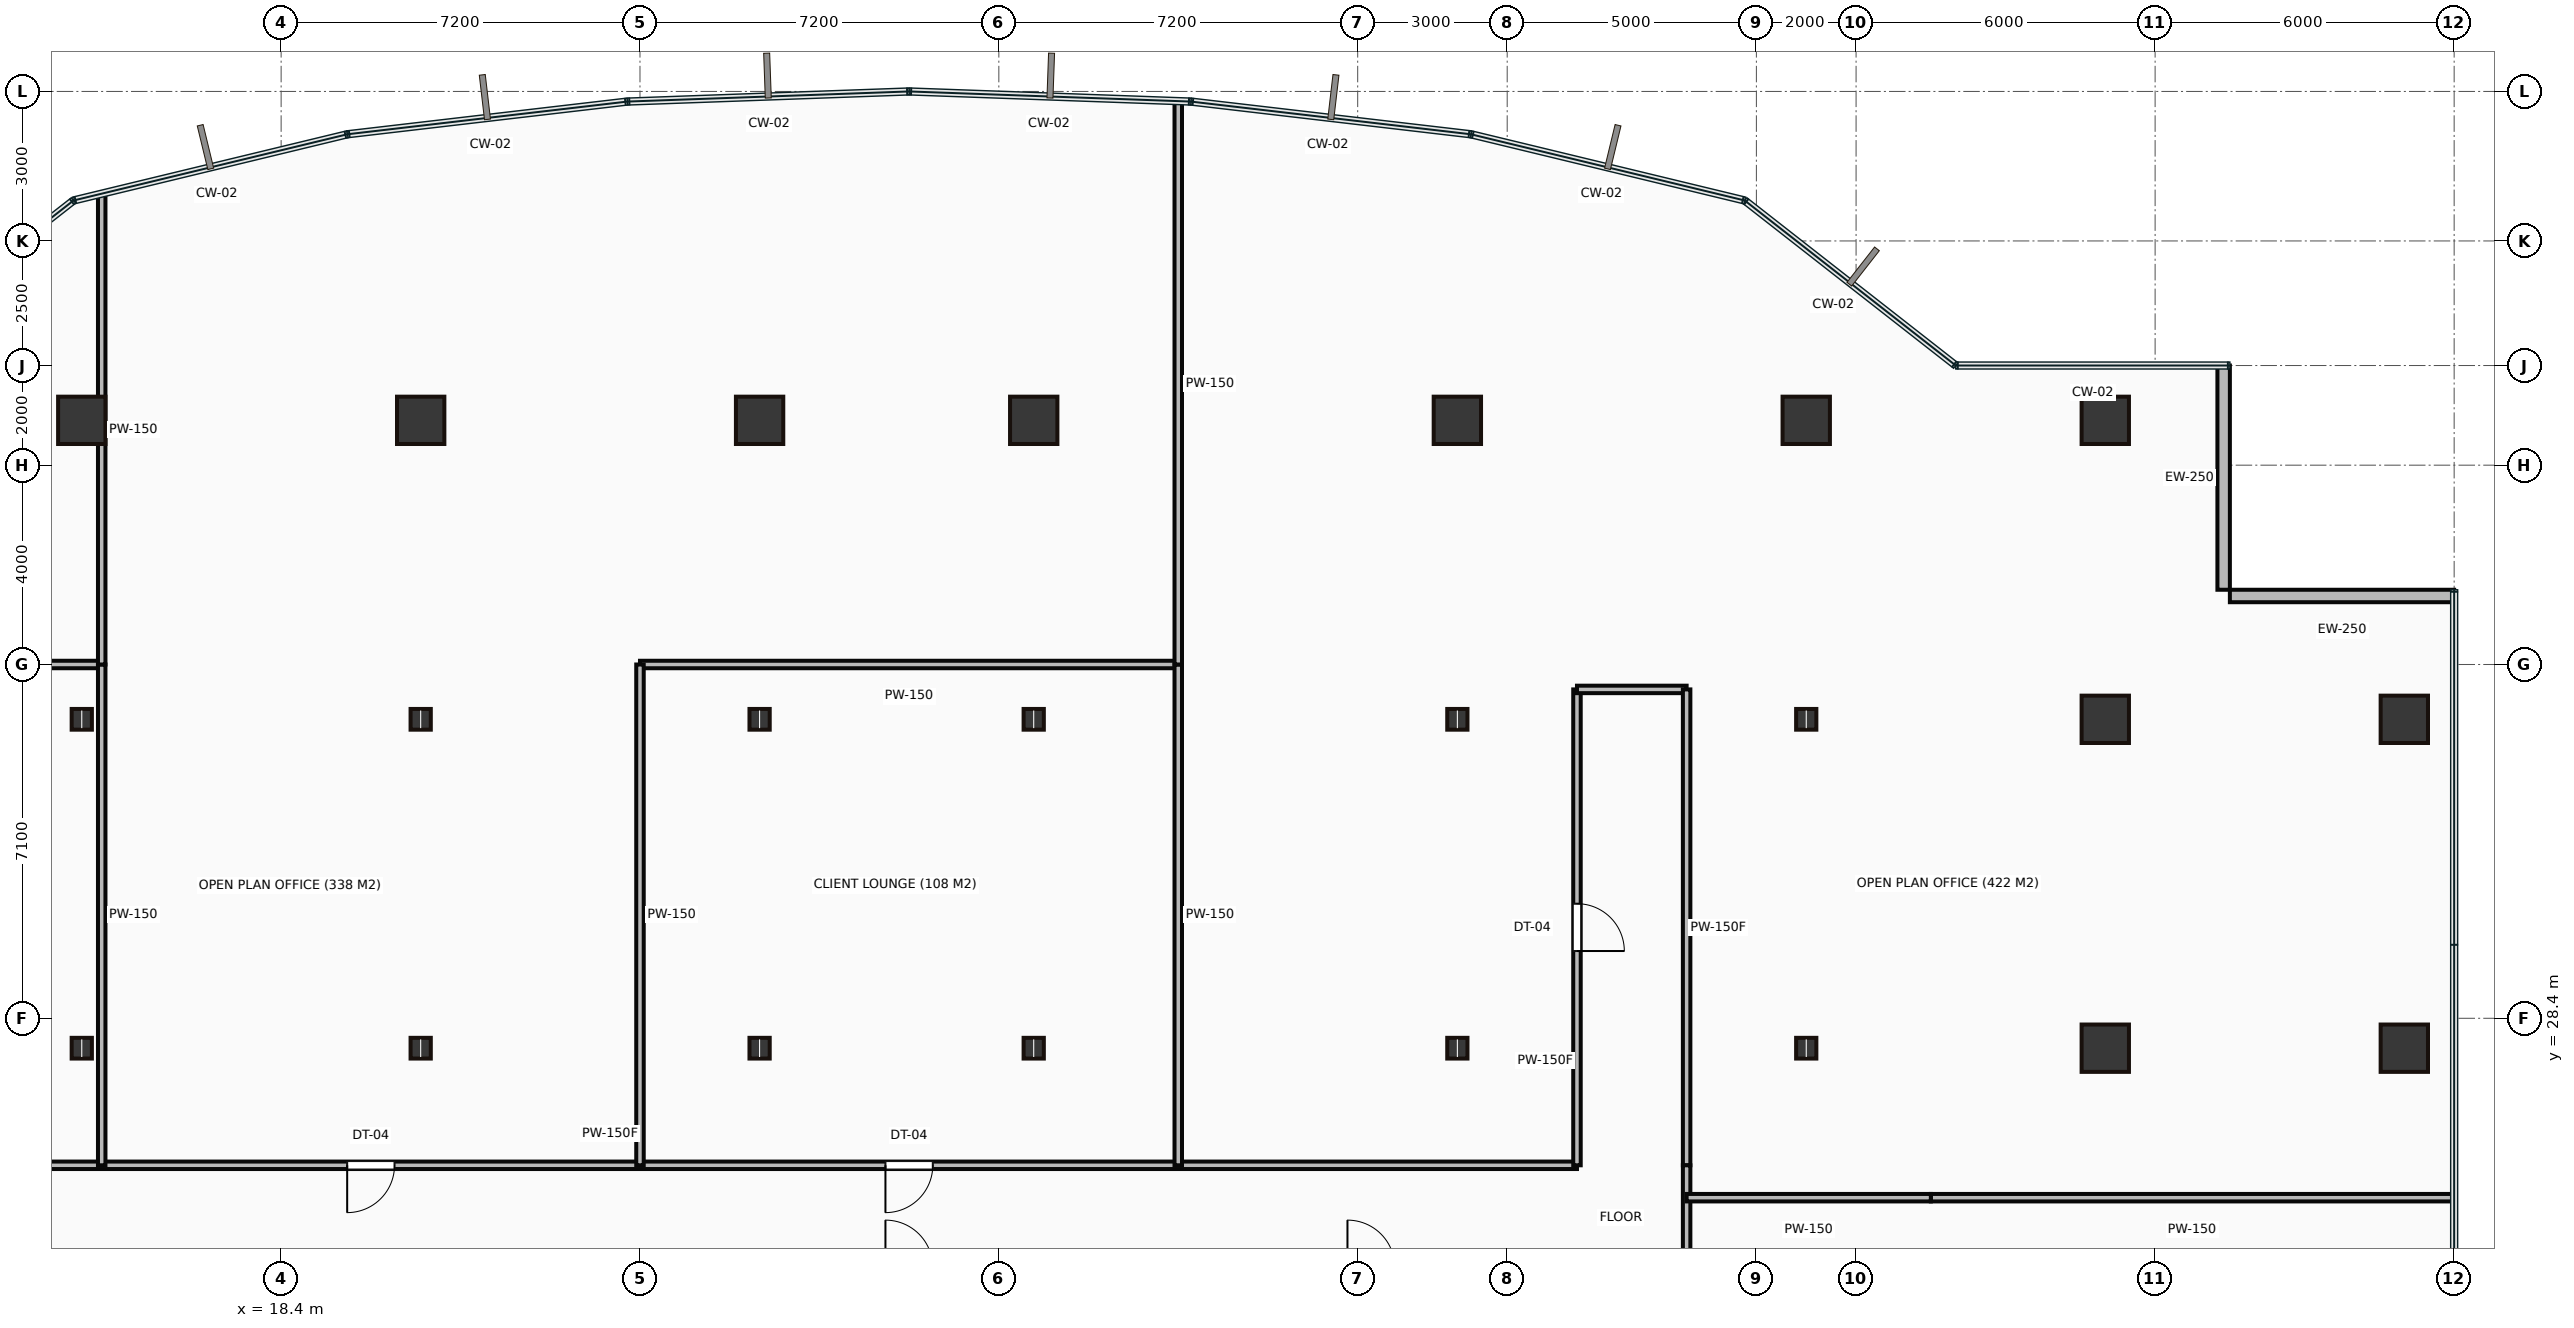
"""IFC4 building model, lengths in metres.
Left out: names, types, materials, properties, quantities, classifications, styles, units other than length and angle.
Written with IfcOpenShell. Run it as: python <this file> out.ifc"""

import sys

from ifc_helpers import new_model, si_unit, direction, frame, frame_2d, origin, origin_2d, place, context, subcontext, project, spatial, rectangle, hollow_rectangle, i_section, extrude, source, transform, mapped, element, fill, save


model = new_model("IFC4")
c1 = context("Model", 3, precision=1e-05, world=origin(), true_north=direction((0.0, 1.0)))
c2 = subcontext(c1, "Body", "Model", "MODEL_VIEW")
j1 = project(units=[si_unit("LENGTHUNIT", "METRE"), si_unit("PLANEANGLEUNIT", "RADIAN")], contexts=[c1])
p1 = place(None, origin())
s1 = spatial("IfcSite", under=j1, at=p1, CompositionType="ELEMENT")
p2 = place(p1, origin())
s2 = spatial("IfcBuilding", under=s1, at=p2, CompositionType="ELEMENT")
p3 = place(p2, frame((0.0, 0.0, 69.0)))
s3 = spatial("IfcBuildingStorey", under=s2, at=p3, CompositionType="ELEMENT", Elevation=69.0)
m1 = source(origin(), c2, "Body", "SweptSolid", [
    extrude(i_section(OverallWidth=0.406, OverallDepth=0.416, WebThickness=0.03, FlangeThickness=0.048, at=origin_2d()), origin(), (0.0, 0.0, 1.0), 3.65),
])
for number, where, z_axis, x_axis in (
    (1, (14.4, 27.8, 0.0), (0.0, 0.0, 1.0), (1.0, 0.0, 0.0)),
    (2, (14.4, 34.4, 0.0), (0.0, 0.0, 1.0), (1.0, 0.0, 0.0)),
):
    element("IfcColumn", number, at=place(p3, frame(where, z_axis=z_axis, x_axis=x_axis)), inside=s3, PredefinedType="COLUMN", context=c2, shape_type="MappedRepresentation", body=[
        mapped(m1, transform((0.0, 0.0, 0.0))),
    ])
m2 = source(origin(), c2, "Body", "SweptSolid", [
    extrude(hollow_rectangle(XDim=0.95, YDim=0.95, WallThickness=0.045, at=origin_2d()), origin(), (0.0, 0.0, 1.0), 3.65),
])
p4 = place(p3, frame((14.4, 40.4, 0.0), z_axis=(0.0, 0.0, 1.0), x_axis=(1.0, 0.0, 0.0)))
e3 = element("IfcColumn", 3, at=p4, inside=s3, PredefinedType="COLUMN", context=c2, shape_type="MappedRepresentation", body=[
    mapped(m2, transform((0.0, 0.0, 0.0))),
])
for number, where, z_axis, x_axis in (
    (4, (21.2, 27.8, 0.0), (0.0, 0.0, 1.0), (1.0, 0.0, 0.0)),
    (5, (21.2, 34.4, 0.0), (0.0, 0.0, 1.0), (1.0, 0.0, 0.0)),
):
    element("IfcColumn", number, at=place(p3, frame(where, z_axis=z_axis, x_axis=x_axis)), inside=s3, PredefinedType="COLUMN", context=c2, shape_type="MappedRepresentation", body=[
        mapped(m1, transform((0.0, 0.0, 0.0))),
    ])
p5 = place(p3, frame((21.2, 40.4, 0.0), z_axis=(0.0, 0.0, 1.0), x_axis=(1.0, 0.0, 0.0)))
e6 = element("IfcColumn", 6, at=p5, inside=s3, PredefinedType="COLUMN", context=c2, shape_type="MappedRepresentation", body=[
    mapped(m2, transform((0.0, 0.0, 0.0))),
])
for number, where, z_axis, x_axis in (
    (7, (28.0, 27.8, 0.0), (0.0, 0.0, 1.0), (1.0, 0.0, 0.0)),
    (8, (28.0, 34.4, 0.0), (0.0, 0.0, 1.0), (1.0, 0.0, 0.0)),
):
    element("IfcColumn", number, at=place(p3, frame(where, z_axis=z_axis, x_axis=x_axis)), inside=s3, PredefinedType="COLUMN", context=c2, shape_type="MappedRepresentation", body=[
        mapped(m1, transform((0.0, 0.0, 0.0))),
    ])
p6 = place(p3, frame((28.0, 40.4, 0.0), z_axis=(0.0, 0.0, 1.0), x_axis=(1.0, 0.0, 0.0)))
e9 = element("IfcColumn", 9, at=p6, inside=s3, PredefinedType="COLUMN", context=c2, shape_type="MappedRepresentation", body=[
    mapped(m2, transform((0.0, 0.0, 0.0))),
])
for number, where, z_axis, x_axis in (
    (10, (33.5, 27.8, 0.0), (0.0, 0.0, 1.0), (1.0, 0.0, 0.0)),
    (11, (33.5, 34.4, 0.0), (0.0, 0.0, 1.0), (1.0, 0.0, 0.0)),
):
    element("IfcColumn", number, at=place(p3, frame(where, z_axis=z_axis, x_axis=x_axis)), inside=s3, PredefinedType="COLUMN", context=c2, shape_type="MappedRepresentation", body=[
        mapped(m1, transform((0.0, 0.0, 0.0))),
    ])
p7 = place(p3, frame((33.5, 40.4, 0.0), z_axis=(0.0, 0.0, 1.0), x_axis=(1.0, 0.0, 0.0)))
e12 = element("IfcColumn", 12, at=p7, inside=s3, PredefinedType="COLUMN", context=c2, shape_type="MappedRepresentation", body=[
    mapped(m2, transform((0.0, 0.0, 0.0))),
])
for number, where, z_axis, x_axis in (
    (13, (42.0, 27.8, 0.0), (0.0, 0.0, 1.0), (1.0, 0.0, 0.0)),
    (14, (42.0, 34.4, 0.0), (0.0, 0.0, 1.0), (1.0, 0.0, 0.0)),
):
    element("IfcColumn", number, at=place(p3, frame(where, z_axis=z_axis, x_axis=x_axis)), inside=s3, PredefinedType="COLUMN", context=c2, shape_type="MappedRepresentation", body=[
        mapped(m1, transform((0.0, 0.0, 0.0))),
    ])
p8 = place(p3, frame((42.0, 40.4, 0.0), z_axis=(0.0, 0.0, 1.0), x_axis=(1.0, 0.0, 0.0)))
e15 = element("IfcColumn", 15, at=p8, inside=s3, PredefinedType="COLUMN", context=c2, shape_type="MappedRepresentation", body=[
    mapped(m2, transform((0.0, 0.0, 0.0))),
])
for number, where, z_axis, x_axis in (
    (16, (49.0, 27.8, 0.0), (0.0, 0.0, 1.0), (1.0, 0.0, 0.0)),
    (17, (49.0, 34.4, 0.0), (0.0, 0.0, 1.0), (1.0, 0.0, 0.0)),
):
    element("IfcColumn", number, at=place(p3, frame(where, z_axis=z_axis, x_axis=x_axis)), inside=s3, PredefinedType="COLUMN", context=c2, shape_type="MappedRepresentation", body=[
        mapped(m1, transform((0.0, 0.0, 0.0))),
    ])
for number, where, z_axis, x_axis in (
    (18, (49.0, 40.4, 0.0), (0.0, 0.0, 1.0), (1.0, 0.0, 0.0)),
    (19, (55.0, 27.8, 0.0), (0.0, 0.0, 1.0), (1.0, 0.0, 0.0)),
    (20, (55.0, 34.4, 0.0), (0.0, 0.0, 1.0), (1.0, 0.0, 0.0)),
    (21, (55.0, 40.4, 0.0), (0.0, 0.0, 1.0), (1.0, 0.0, 0.0)),
    (22, (61.0, 27.8, 0.0), (0.0, 0.0, 1.0), (1.0, 0.0, 0.0)),
    (23, (61.0, 34.4, 0.0), (0.0, 0.0, 1.0), (1.0, 0.0, 0.0)),
):
    element("IfcColumn", number, at=place(p3, frame(where, z_axis=z_axis, x_axis=x_axis)), inside=s3, PredefinedType="COLUMN", context=c2, shape_type="MappedRepresentation", body=[
        mapped(m2, transform((0.0, 0.0, 0.0))),
    ])
m3 = source(origin(), c2, "Body", "SweptSolid", [
    extrude(rectangle(XDim=4.5, YDim=0.25, at=frame_2d((2.25, 0.0))), origin(), (0.0, 0.0, 1.0), 3.4),
])
for number, where, z_axis, x_axis in (
    (24, (62.0, 36.875, 0.0), (0.0, 0.0, 1.0), (-1.0, 0.0, 0.0)),
    (25, (57.375, 37.0, 0.0), (0.0, 0.0, 1.0), (0.0, 1.0, 0.0)),
):
    element("IfcWall", number, at=place(p3, frame(where, z_axis=z_axis, x_axis=x_axis)), inside=s3, PredefinedType="STANDARD", context=c2, shape_type="MappedRepresentation", body=[
        mapped(m3, transform((0.0, 0.0, 0.0))),
    ])
m4 = source(origin(), c2, "Body", "SweptSolid", [
    extrude(rectangle(XDim=38.8, YDim=0.15, at=frame_2d((19.4, 0.0))), origin(), (0.0, 0.0, 1.0), 3.4),
])
p9 = place(p3, frame((5.6, 25.45, 0.0), z_axis=(0.0, 0.0, 1.0), x_axis=(1.0, 0.0, 0.0)))
e26 = element("IfcWall", 26, at=p9, inside=s3, PredefinedType="PARTITIONING", context=c2, shape_type="MappedRepresentation", body=[
    mapped(m4, transform((0.0, 0.0, 0.0))),
])
p10 = place(p9, frame((14.125, 0.0, 0.0)))
e27 = element("IfcOpeningElement", 27, at=p10, cuts=e26, PredefinedType="OPENING", context=c2, shape_type="SweptSolid", body=[
    extrude(rectangle(XDim=0.95, YDim=2.15, at=frame_2d((0.475, 1.075))), frame((0.0, 0.085, 0.0), z_axis=(0.0, -1.0, 0.0), x_axis=(1.0, 0.0, 0.0)), (0.0, 0.0, 1.0), 0.17),
])
p11 = place(p9, frame((24.925, 0.0, 0.0)))
e28 = element("IfcOpeningElement", 28, at=p11, cuts=e26, PredefinedType="OPENING", context=c2, shape_type="SweptSolid", body=[
    extrude(rectangle(XDim=0.95, YDim=2.15, at=frame_2d((0.475, 1.075))), frame((0.0, 0.085, 0.0), z_axis=(0.0, -1.0, 0.0), x_axis=(1.0, 0.0, 0.0)), (0.0, 0.0, 1.0), 0.17),
])
m5 = source(origin(), c2, "Body", "SweptSolid", [
    extrude(rectangle(XDim=9.55, YDim=0.15, at=frame_2d((4.775, 0.0))), origin(), (0.0, 0.0, 1.0), 3.4),
])
p12 = place(p3, frame((44.4, 25.45, 0.0), z_axis=(0.0, 0.0, 1.0), x_axis=(0.0, 1.0, 0.0)))
e29 = element("IfcWall", 29, at=p12, inside=s3, PredefinedType="PARTITIONING", context=c2, shape_type="MappedRepresentation", body=[
    mapped(m5, transform((0.0, 0.0, 0.0))),
])
p13 = place(p12, frame((4.3, 0.0, 0.0)))
e30 = element("IfcOpeningElement", 30, at=p13, cuts=e29, PredefinedType="OPENING", context=c2, shape_type="SweptSolid", body=[
    extrude(rectangle(XDim=0.95, YDim=2.15, at=frame_2d((0.475, 1.075))), frame((0.0, 0.085, 0.0), z_axis=(0.0, -1.0, 0.0), x_axis=(1.0, 0.0, 0.0)), (0.0, 0.0, 1.0), 0.17),
])
m6 = source(origin(), c2, "Body", "SweptSolid", [
    extrude(rectangle(XDim=2.2, YDim=0.15, at=frame_2d((1.1, 0.0))), origin(), (0.0, 0.0, 1.0), 3.4),
])
p14 = place(p3, frame((44.4, 35.0, 0.0), z_axis=(0.0, 0.0, 1.0), x_axis=(1.0, 0.0, 0.0)))
e31 = element("IfcWall", 31, at=p14, inside=s3, PredefinedType="PARTITIONING", context=c2, shape_type="MappedRepresentation", body=[
    mapped(m6, transform((0.0, 0.0, 0.0))),
])
p15 = place(p3, frame((46.6, 35.0, 0.0), z_axis=(0.0, 0.0, 1.0), x_axis=(0.0, -1.0, 0.0)))
e32 = element("IfcWall", 32, at=p15, inside=s3, PredefinedType="PARTITIONING", context=c2, shape_type="MappedRepresentation", body=[
    mapped(m5, transform((0.0, 0.0, 0.0))),
])
m7 = source(origin(), c2, "Body", "SweptSolid", [
    extrude(rectangle(XDim=2.05, YDim=0.15, at=frame_2d((1.025, 0.0))), origin(), (0.0, 0.0, 1.0), 3.4),
])
p16 = place(p3, frame((46.6, 25.45, 0.0), z_axis=(0.0, 0.0, 1.0), x_axis=(0.0, -1.0, 0.0)))
e33 = element("IfcWall", 33, at=p16, inside=s3, PredefinedType="PARTITIONING", context=c2, shape_type="MappedRepresentation", body=[
    mapped(m7, transform((0.0, 0.0, 0.0))),
])
m8 = source(origin(), c2, "Body", "SweptSolid", [
    extrude(rectangle(XDim=9.2, YDim=0.15, at=frame_2d((4.6, 0.0))), origin(), (0.0, 0.0, 1.0), 3.4),
])
p17 = place(p3, frame((14.8, 35.5, 0.0), z_axis=(0.0, 0.0, 1.0), x_axis=(-1.0, 0.0, 0.0)))
e34 = element("IfcWall", 34, at=p17, inside=s3, PredefinedType="PARTITIONING", context=c2, shape_type="MappedRepresentation", body=[
    mapped(m8, transform((0.0, 0.0, 0.0))),
])
m9 = source(origin(), c2, "Body", "SweptSolid", [
    extrude(rectangle(XDim=10.05, YDim=0.15, at=frame_2d((5.025, 0.0))), origin(), (0.0, 0.0, 1.0), 3.4),
])
p18 = place(p3, frame((14.8, 35.5, 0.0), z_axis=(0.0, 0.0, 1.0), x_axis=(0.0, -1.0, 0.0)))
e35 = element("IfcWall", 35, at=p18, inside=s3, PredefinedType="PARTITIONING", context=c2, shape_type="MappedRepresentation", body=[
    mapped(m9, transform((0.0, 0.0, 0.0))),
])
m10 = source(origin(), c2, "Body", "SweptSolid", [
    extrude(rectangle(XDim=9.428, YDim=0.15, at=frame_2d((4.714, 0.0))), origin(), (0.0, 0.0, 1.0), 3.4),
])
p19 = place(p3, frame((14.8, 44.928, 0.0), z_axis=(0.0, 0.0, 1.0), x_axis=(0.0, -1.0, 0.0)))
e36 = element("IfcWall", 36, at=p19, inside=s3, PredefinedType="PARTITIONING", context=c2, shape_type="MappedRepresentation", body=[
    mapped(m10, transform((0.0, 0.0, 0.0))),
])
m11 = source(origin(), c2, "Body", "SweptSolid", [
    extrude(rectangle(XDim=10.8, YDim=0.15, at=frame_2d((5.4, 0.0))), origin(), (0.0, 0.0, 1.0), 3.4),
])
p20 = place(p3, frame((36.4, 35.5, 0.0), z_axis=(0.0, 0.0, 1.0), x_axis=(-1.0, 0.0, 0.0)))
e37 = element("IfcWall", 37, at=p20, inside=s3, PredefinedType="PARTITIONING", context=c2, shape_type="MappedRepresentation", body=[
    mapped(m11, transform((0.0, 0.0, 0.0))),
])
for number, where, z_axis, x_axis in (
    (38, (25.6, 35.5, 0.0), (0.0, 0.0, 1.0), (0.0, -1.0, 0.0)),
    (39, (36.4, 35.5, 0.0), (0.0, 0.0, 1.0), (0.0, -1.0, 0.0)),
):
    element("IfcWall", number, at=place(p3, frame(where, z_axis=z_axis, x_axis=x_axis)), inside=s3, PredefinedType="PARTITIONING", context=c2, shape_type="MappedRepresentation", body=[
        mapped(m9, transform((0.0, 0.0, 0.0))),
    ])
m12 = source(origin(), c2, "Body", "SweptSolid", [
    extrude(rectangle(XDim=11.286, YDim=0.15, at=frame_2d((5.643, 0.0))), origin(), (0.0, 0.0, 1.0), 3.4),
])
p21 = place(p3, frame((36.4, 46.786, 0.0), z_axis=(0.0, 0.0, 1.0), x_axis=(0.0, -1.0, 0.0)))
e40 = element("IfcWall", 40, at=p21, inside=s3, PredefinedType="PARTITIONING", context=c2, shape_type="MappedRepresentation", body=[
    mapped(m12, transform((0.0, 0.0, 0.0))),
])
m13 = source(origin(), c2, "Body", "SweptSolid", [
    extrude(rectangle(XDim=10.48, YDim=0.15, at=frame_2d((5.24, 0.0))), origin(), (0.0, 0.0, 1.0), 3.4),
])
p22 = place(p3, frame((61.98, 24.8, 0.0), z_axis=(0.0, 0.0, 1.0), x_axis=(-1.0, 0.0, 0.0)))
e41 = element("IfcWall", 41, at=p22, inside=s3, PredefinedType="PARTITIONING", context=c2, shape_type="MappedRepresentation", body=[
    mapped(m13, transform((0.0, 0.0, 0.0))),
])
m14 = source(origin(), c2, "Body", "SweptSolid", [
    extrude(rectangle(XDim=4.9, YDim=0.15, at=frame_2d((2.45, 0.0))), origin(), (0.0, 0.0, 1.0), 3.4),
])
p23 = place(p3, frame((51.5, 24.8, 0.0), z_axis=(0.0, 0.0, 1.0), x_axis=(-1.0, 0.0, 0.0)))
e42 = element("IfcWall", 42, at=p23, inside=s3, PredefinedType="PARTITIONING", context=c2, shape_type="MappedRepresentation", body=[
    mapped(m14, transform((0.0, 0.0, 0.0))),
])
m15 = source(origin(), c2, "Body", "SweptSolid", [
    extrude(rectangle(XDim=0.95, YDim=2.15, at=frame_2d((0.475, 1.075))), frame((0.0, 0.025, 0.0), z_axis=(0.0, -1.0, 0.0), x_axis=(1.0, 0.0, 0.0)), (0.0, 0.0, 1.0), 0.05),
])
p24 = place(p10, origin())
e43 = element("IfcDoor", 43, at=p24, inside=s3, OperationType="SINGLE_SWING_LEFT", PredefinedType="DOOR", context=c2, shape_type="MappedRepresentation", body=[
    mapped(m15, transform((0.0, 0.0, 0.0))),
])
fill(e27, e43)
p25 = place(p11, origin())
e44 = element("IfcDoor", 44, at=p25, inside=s3, OperationType="SINGLE_SWING_LEFT", PredefinedType="DOOR", context=c2, shape_type="MappedRepresentation", body=[
    mapped(m15, transform((0.0, 0.0, 0.0))),
])
fill(e28, e44)
p26 = place(p13, origin())
e45 = element("IfcDoor", 45, at=p26, inside=s3, OperationType="SINGLE_SWING_LEFT", PredefinedType="DOOR", context=c2, shape_type="MappedRepresentation", body=[
    mapped(m15, transform((0.0, 0.0, 0.0))),
])
fill(e30, e45)
save(model, sys.argv[1])
